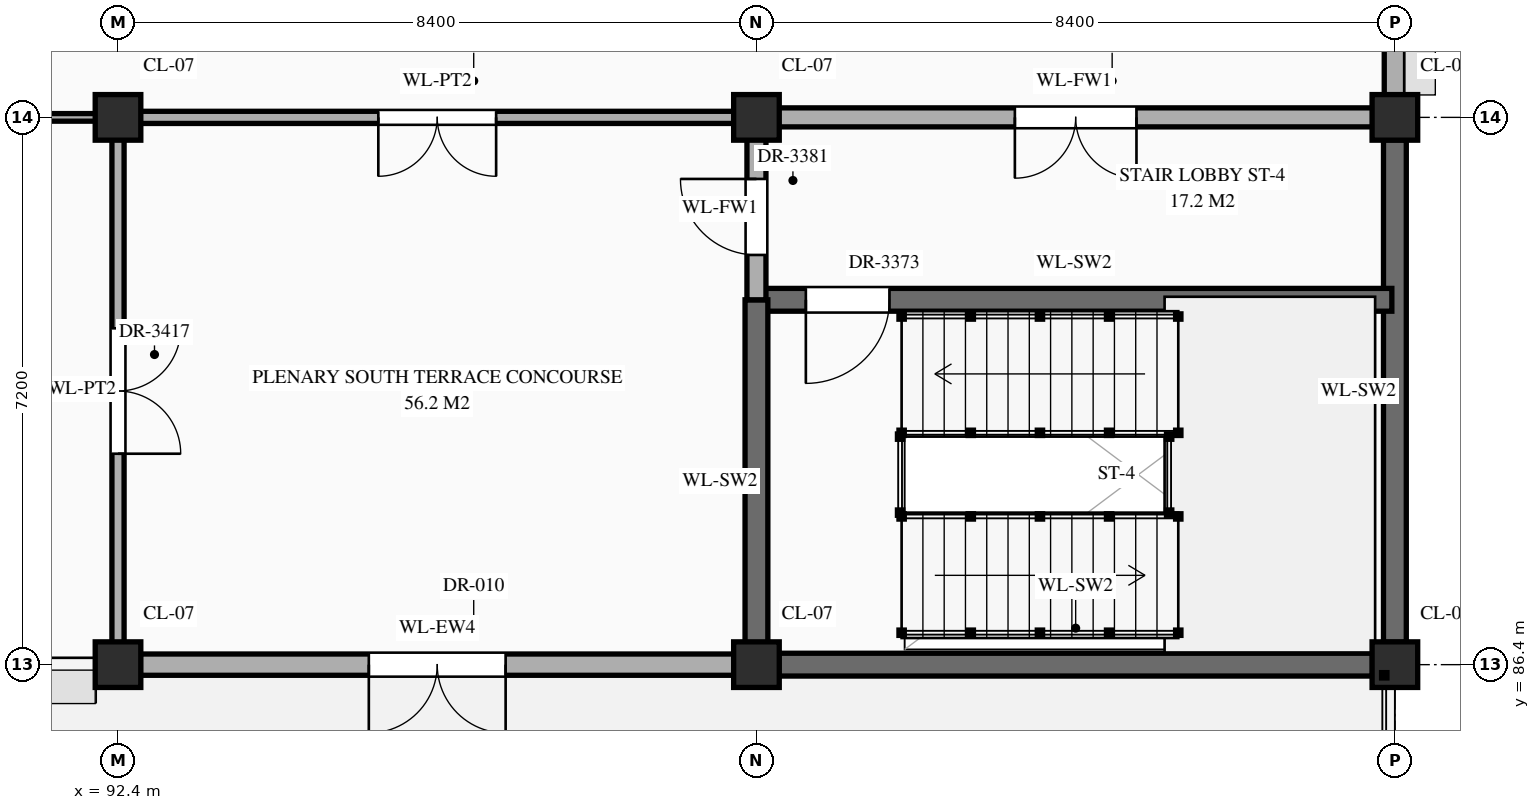
"""IFC4 building model, lengths in metres.
Left out: names, types, materials, properties, quantities, classifications, styles, units other than length and angle.
Written with IfcOpenShell. Run it as: python <this file> out.ifc"""

import sys

from ifc_helpers import new_model, si_unit, direction, frame, frame_2d, origin, origin_2d, place, context, subcontext, project, spatial, rectangle, extrude, element, fill, save


model = new_model("IFC4")
c1 = context("Model", 3, precision=1e-05, world=origin(), true_north=direction((0.0, 1.0)))
c2 = subcontext(c1, "Body", "Model", "MODEL_VIEW")
j1 = project(units=[si_unit("LENGTHUNIT", "METRE"), si_unit("PLANEANGLEUNIT", "RADIAN")], contexts=[c1])
p1 = place(None, origin())
s1 = spatial("IfcSite", under=j1, at=p1, CompositionType="ELEMENT")
p2 = place(p1, origin())
s2 = spatial("IfcBuilding", under=s1, at=p2, CompositionType="ELEMENT")
p3 = place(p2, frame((0.0, 0.0, 68.7)))
s3 = spatial("IfcBuildingStorey", under=s2, at=p3, CompositionType="ELEMENT", Elevation=68.7)
for number, where, z_axis, x_axis in (
    (1, (92.4, 86.4, 0.0), (0.0, 0.0, 1.0), (1.0, 0.0, 0.0)),
    (2, (92.4, 93.6, 0.0), (0.0, 0.0, 1.0), (1.0, 0.0, 0.0)),
    (3, (100.8, 86.4, 0.0), (0.0, 0.0, 1.0), (1.0, 0.0, 0.0)),
    (4, (100.8, 93.6, 0.0), (0.0, 0.0, 1.0), (1.0, 0.0, 0.0)),
    (5, (109.2, 86.4, 0.0), (0.0, 0.0, 1.0), (1.0, 0.0, 0.0)),
    (6, (109.2, 93.6, 0.0), (0.0, 0.0, 1.0), (1.0, 0.0, 0.0)),
):
    element("IfcColumn", number, at=place(p3, frame(where, z_axis=z_axis, x_axis=x_axis)), inside=s3, PredefinedType="COLUMN", context=c2, shape_type="SweptSolid", body=[
        extrude(rectangle(XDim=0.6, YDim=0.6, at=origin_2d()), origin(), (0.0, 0.0, 1.0), 4.5),
    ])
p4 = place(p3, frame((92.695, 86.4, 0.0), z_axis=(0.0, 0.0, 1.0), x_axis=(1.0, 0.0, 0.0)))
e7 = element("IfcWall", 7, at=p4, inside=s3, PredefinedType="STANDARD", context=c2, shape_type="SweptSolid", body=[
    extrude(rectangle(XDim=7.81, YDim=0.28, at=frame_2d((3.905, 0.0))), origin(), (0.0, 0.0, 1.0), 3.47),
])
p5 = place(p4, frame((3.005, 0.0, 0.0)))
e8 = element("IfcOpeningElement", 8, at=p5, cuts=e7, PredefinedType="OPENING", context=c2, shape_type="SweptSolid", body=[
    extrude(rectangle(XDim=1.8, YDim=2.25, at=frame_2d((0.9, 1.125))), frame((0.0, 0.152, 0.0), z_axis=(0.0, -1.0, 0.0), x_axis=(1.0, 0.0, 0.0)), (0.0, 0.0, 1.0), 0.304),
])
p6 = place(p3, frame((101.095, 86.4, 0.0), z_axis=(0.0, 0.0, 1.0), x_axis=(1.0, 0.0, 0.0)))
e9 = element("IfcWall", 9, at=p6, inside=s3, PredefinedType="SHEAR", context=c2, shape_type="SweptSolid", body=[
    extrude(rectangle(XDim=7.81, YDim=0.3, at=frame_2d((3.905, 0.0))), origin(), (0.0, 0.0, 1.0), 4.12),
])
p7 = place(p3, frame((109.2, 86.695, 0.0), z_axis=(0.0, 0.0, 1.0), x_axis=(0.0, 1.0, 0.0)))
e10 = element("IfcWall", 10, at=p7, inside=s3, PredefinedType="SHEAR", context=c2, shape_type="SweptSolid", body=[
    extrude(rectangle(XDim=6.61, YDim=0.3, at=frame_2d((3.305, 0.0))), origin(), (0.0, 0.0, 1.0), 4.12),
])
p8 = place(p3, frame((109.2, 93.895, 0.0), z_axis=(0.0, 0.0, 1.0), x_axis=(0.0, 1.0, 0.0)))
e11 = element("IfcWall", 11, at=p8, inside=s3, PredefinedType="STANDARD", context=c2, shape_type="SweptSolid", body=[
    extrude(rectangle(XDim=6.61, YDim=0.28, at=frame_2d((3.305, 0.0))), origin(), (0.0, 0.0, 1.0), 3.47),
])
p9 = place(p8, frame((4.005, 0.0, 0.85)))
e12 = element("IfcOpeningElement", 12, at=p9, cuts=e11, PredefinedType="OPENING", context=c2, shape_type="SweptSolid", body=[
    extrude(rectangle(XDim=1.2, YDim=1.92, at=frame_2d((0.6, 0.96))), frame((0.0, 0.152, 0.0), z_axis=(0.0, -1.0, 0.0), x_axis=(1.0, 0.0, 0.0)), (0.0, 0.0, 1.0), 0.304),
])
p10 = place(p3, frame((100.8, 91.2, 0.0), z_axis=(0.0, 0.0, 1.0), x_axis=(1.0, 0.0, 0.0)))
e13 = element("IfcWall", 13, at=p10, inside=s3, PredefinedType="SHEAR", context=c2, shape_type="SweptSolid", body=[
    extrude(rectangle(XDim=8.36, YDim=0.3, at=frame_2d((4.18, 0.0))), origin(), (0.0, 0.0, 1.0), 4.12),
])
p11 = place(p10, frame((0.65, 0.0, 0.0)))
e14 = element("IfcOpeningElement", 14, at=p11, cuts=e13, PredefinedType="OPENING", context=c2, shape_type="SweptSolid", body=[
    extrude(rectangle(XDim=1.1, YDim=2.2, at=frame_2d((0.55, 1.1))), frame((0.0, 0.162, 0.0), z_axis=(0.0, -1.0, 0.0), x_axis=(1.0, 0.0, 0.0)), (0.0, 0.0, 1.0), 0.324),
])
p12 = place(p3, frame((75.6, 93.6, 0.0), z_axis=(0.0, 0.0, 1.0), x_axis=(1.0, 0.0, 0.0)))
e15 = element("IfcWall", 15, at=p12, inside=s3, PredefinedType="STANDARD", context=c2, shape_type="SweptSolid", body=[
    extrude(rectangle(XDim=16.8, YDim=0.1, at=frame_2d((8.4, 0.0))), origin(), (0.0, 0.0, 1.0), 3.27),
])
p13 = place(p12, frame((3.425, 0.0, 0.0)))
e16 = element("IfcOpeningElement", 16, at=p13, cuts=e15, PredefinedType="OPENING", context=c2, shape_type="SweptSolid", body=[
    extrude(rectangle(XDim=1.55, YDim=2.35, at=frame_2d((0.775, 1.175))), frame((0.0, 0.062, 0.0), z_axis=(0.0, -1.0, 0.0), x_axis=(1.0, 0.0, 0.0)), (0.0, 0.0, 1.0), 0.124),
])
p14 = place(p12, frame((11.98, 0.0, 0.0)))
e17 = element("IfcOpeningElement", 17, at=p14, cuts=e15, PredefinedType="OPENING", context=c2, shape_type="SweptSolid", body=[
    extrude(rectangle(XDim=1.24, YDim=2.3, at=frame_2d((0.62, 1.15))), frame((0.0, 0.062, 0.0), z_axis=(0.0, -1.0, 0.0), x_axis=(1.0, 0.0, 0.0)), (0.0, 0.0, 1.0), 0.124),
])
p15 = place(p3, frame((92.4, 93.6, 0.0), z_axis=(0.0, 0.0, 1.0), x_axis=(1.0, 0.0, 0.0)))
e18 = element("IfcWall", 18, at=p15, inside=s3, PredefinedType="STANDARD", context=c2, shape_type="SweptSolid", body=[
    extrude(rectangle(XDim=8.4, YDim=0.16, at=frame_2d((4.2, 0.0))), origin(), (0.0, 0.0, 1.0), 3.27),
])
p16 = place(p15, frame((3.425, 0.0, 0.0)))
e19 = element("IfcOpeningElement", 19, at=p16, cuts=e18, PredefinedType="OPENING", context=c2, shape_type="SweptSolid", body=[
    extrude(rectangle(XDim=1.55, YDim=2.35, at=frame_2d((0.775, 1.175))), frame((0.0, 0.092, 0.0), z_axis=(0.0, -1.0, 0.0), x_axis=(1.0, 0.0, 0.0)), (0.0, 0.0, 1.0), 0.184),
])
p17 = place(p3, frame((100.8, 93.6, 0.0), z_axis=(0.0, 0.0, 1.0), x_axis=(1.0, 0.0, 0.0)))
e20 = element("IfcWall", 20, at=p17, inside=s3, PredefinedType="STANDARD", context=c2, shape_type="SweptSolid", body=[
    extrude(rectangle(XDim=8.36, YDim=0.25, at=frame_2d((4.18, 0.0))), origin(), (0.0, 0.0, 1.0), 3.27),
])
p18 = place(p17, frame((3.4, 0.0, 0.0)))
e21 = element("IfcOpeningElement", 21, at=p18, cuts=e20, PredefinedType="OPENING", context=c2, shape_type="SweptSolid", body=[
    extrude(rectangle(XDim=1.6, YDim=2.3, at=frame_2d((0.8, 1.15))), frame((0.0, 0.137, 0.0), z_axis=(0.0, -1.0, 0.0), x_axis=(1.0, 0.0, 0.0)), (0.0, 0.0, 1.0), 0.274),
])
p19 = place(p3, frame((92.4, 86.44, 0.0), z_axis=(0.0, 0.0, 1.0), x_axis=(0.0, 1.0, 0.0)))
e22 = element("IfcWall", 22, at=p19, inside=s3, PredefinedType="STANDARD", context=c2, shape_type="SweptSolid", body=[
    extrude(rectangle(XDim=7.16, YDim=0.16, at=frame_2d((3.58, 0.0))), origin(), (0.0, 0.0, 1.0), 3.37),
])
p20 = place(p19, frame((2.735, 0.0, 0.0)))
e23 = element("IfcOpeningElement", 23, at=p20, cuts=e22, PredefinedType="OPENING", context=c2, shape_type="SweptSolid", body=[
    extrude(rectangle(XDim=1.65, YDim=2.4, at=frame_2d((0.825, 1.2))), frame((0.0, 0.092, 0.0), z_axis=(0.0, -1.0, 0.0), x_axis=(1.0, 0.0, 0.0)), (0.0, 0.0, 1.0), 0.184),
])
p21 = place(p3, frame((100.8, 86.44, 0.0), z_axis=(0.0, 0.0, 1.0), x_axis=(0.0, 1.0, 0.0)))
e24 = element("IfcWall", 24, at=p21, inside=s3, PredefinedType="SHEAR", context=c2, shape_type="SweptSolid", body=[
    extrude(rectangle(XDim=4.76, YDim=0.3, at=frame_2d((2.38, 0.0))), origin(), (0.0, 0.0, 1.0), 4.12),
])
p22 = place(p3, frame((100.8, 91.2, 0.0), z_axis=(0.0, 0.0, 1.0), x_axis=(0.0, 1.0, 0.0)))
e25 = element("IfcWall", 25, at=p22, inside=s3, PredefinedType="STANDARD", context=c2, shape_type="SweptSolid", body=[
    extrude(rectangle(XDim=2.4, YDim=0.25, at=frame_2d((1.2, 0.0))), origin(), (0.0, 0.0, 1.0), 3.37),
])
p23 = place(p22, frame((0.59, 0.0, 0.0)))
e26 = element("IfcOpeningElement", 26, at=p23, cuts=e25, PredefinedType="OPENING", context=c2, shape_type="SweptSolid", body=[
    extrude(rectangle(XDim=1.0, YDim=2.2, at=frame_2d((0.5, 1.1))), frame((0.0, 0.137, 0.0), z_axis=(0.0, -1.0, 0.0), x_axis=(1.0, 0.0, 0.0)), (0.0, 0.0, 1.0), 0.274),
])
p24 = place(p5, frame((1.8, 0.0, 0.0), z_axis=(0.0, 0.0, 1.0), x_axis=(-1.0, 0.0, 0.0)))
e27 = element("IfcDoor", 27, at=p24, inside=s3, OperationType="DOUBLE_DOOR_SINGLE_SWING", PredefinedType="DOOR", context=c2, shape_type="SweptSolid", body=[
    extrude(rectangle(XDim=1.8, YDim=2.25, at=frame_2d((0.9, 1.125))), frame((0.0, 0.025, 0.0), z_axis=(0.0, -1.0, 0.0), x_axis=(1.0, 0.0, 0.0)), (0.0, 0.0, 1.0), 0.05),
])
fill(e8, e27)
p25 = place(p11, frame((1.1, 0.0, 0.0), z_axis=(0.0, 0.0, 1.0), x_axis=(-1.0, 0.0, 0.0)))
e28 = element("IfcDoor", 28, at=p25, inside=s3, OperationType="SINGLE_SWING_RIGHT", PredefinedType="DOOR", context=c2, shape_type="SweptSolid", body=[
    extrude(rectangle(XDim=1.1, YDim=2.2, at=frame_2d((0.55, 1.1))), frame((0.0, 0.025, 0.0), z_axis=(0.0, -1.0, 0.0), x_axis=(1.0, 0.0, 0.0)), (0.0, 0.0, 1.0), 0.05),
])
fill(e14, e28)
p26 = place(p18, frame((1.6, 0.0, 0.0), z_axis=(0.0, 0.0, 1.0), x_axis=(-1.0, 0.0, 0.0)))
e29 = element("IfcDoor", 29, at=p26, inside=s3, OperationType="DOUBLE_DOOR_SINGLE_SWING", PredefinedType="DOOR", context=c2, shape_type="SweptSolid", body=[
    extrude(rectangle(XDim=1.6, YDim=2.3, at=frame_2d((0.8, 1.15))), frame((0.0, 0.025, 0.0), z_axis=(0.0, -1.0, 0.0), x_axis=(1.0, 0.0, 0.0)), (0.0, 0.0, 1.0), 0.05),
])
fill(e21, e29)
p27 = place(p23, origin())
e30 = element("IfcDoor", 30, at=p27, inside=s3, OperationType="SINGLE_SWING_RIGHT", PredefinedType="DOOR", context=c2, shape_type="SweptSolid", body=[
    extrude(rectangle(XDim=1.0, YDim=2.2, at=frame_2d((0.5, 1.1))), frame((0.0, 0.025, 0.0), z_axis=(0.0, -1.0, 0.0), x_axis=(1.0, 0.0, 0.0)), (0.0, 0.0, 1.0), 0.05),
])
fill(e26, e30)
p28 = place(p16, frame((1.55, 0.0, 0.0), z_axis=(0.0, 0.0, 1.0), x_axis=(-1.0, 0.0, 0.0)))
e31 = element("IfcDoor", 31, at=p28, inside=s3, OperationType="DOUBLE_DOOR_SINGLE_SWING", PredefinedType="DOOR", context=c2, shape_type="SweptSolid", body=[
    extrude(rectangle(XDim=1.55, YDim=2.35, at=frame_2d((0.775, 1.175))), frame((0.0, 0.025, 0.0), z_axis=(0.0, -1.0, 0.0), x_axis=(1.0, 0.0, 0.0)), (0.0, 0.0, 1.0), 0.05),
])
fill(e19, e31)
p29 = place(p20, frame((1.65, 0.0, 0.0), z_axis=(0.0, 0.0, 1.0), x_axis=(-1.0, 0.0, 0.0)))
e32 = element("IfcDoor", 32, at=p29, inside=s3, OperationType="DOUBLE_DOOR_SINGLE_SWING", PredefinedType="DOOR", context=c2, shape_type="SweptSolid", body=[
    extrude(rectangle(XDim=1.65, YDim=2.4, at=frame_2d((0.825, 1.2))), frame((0.0, 0.025, 0.0), z_axis=(0.0, -1.0, 0.0), x_axis=(1.0, 0.0, 0.0)), (0.0, 0.0, 1.0), 0.05),
])
fill(e23, e32)
save(model, sys.argv[1])
